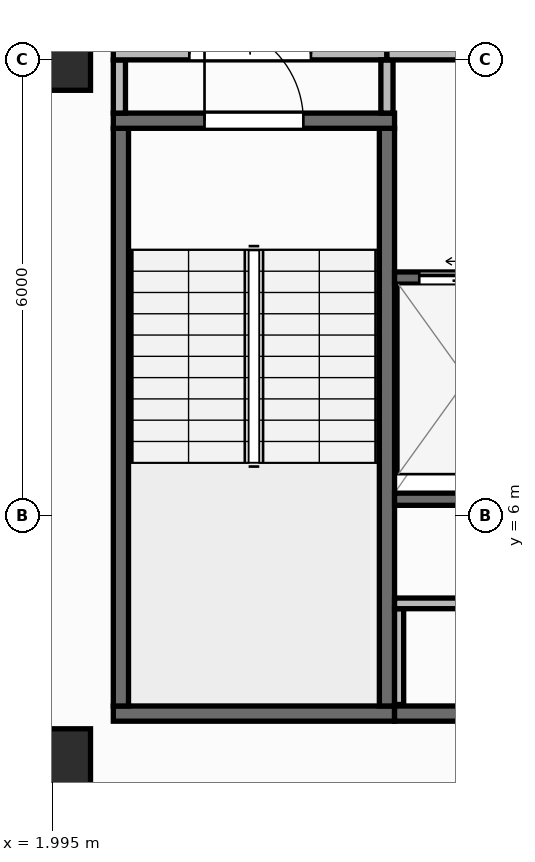
"""IFC4 building model, lengths in metres.
Left out: names, types, materials, properties, quantities, classifications, styles, units other than length and angle.
Written with IfcOpenShell. Run it as: python <this file> out.ifc"""

import sys

from ifc_helpers import new_model, si_unit, direction, frame, frame_2d, origin, origin_2d, place, context, subcontext, project, spatial, rectangle, extrude, element, fill, save


model = new_model("IFC4")
c1 = context("Model", 3, precision=1e-05, world=origin(), true_north=direction((0.0, 1.0)))
c2 = subcontext(c1, "Body", "Model", "MODEL_VIEW")
j1 = project(units=[si_unit("LENGTHUNIT", "METRE"), si_unit("PLANEANGLEUNIT", "RADIAN")], contexts=[c1])
p1 = place(None, origin())
s1 = spatial("IfcSite", under=j1, at=p1, CompositionType="ELEMENT")
p2 = place(p1, origin())
s2 = spatial("IfcBuilding", under=s1, at=p2, CompositionType="ELEMENT")
p3 = place(p2, frame((0.0, 0.0, 276.3)))
s3 = spatial("IfcBuildingStorey", under=s2, at=p3, CompositionType="ELEMENT", Elevation=276.3)
for number, where, z_axis, x_axis in (
    (1, (2.1, 2.8, 0.0), (0.0, 0.0, 1.0), (1.0, 0.0, 0.0)),
    (2, (2.1, 12.0, 0.0), (0.0, 0.0, 1.0), (1.0, 0.0, 0.0)),
):
    element("IfcColumn", number, at=place(p3, frame(where, z_axis=z_axis, x_axis=x_axis)), inside=s3, PredefinedType="COLUMN", context=c2, shape_type="SweptSolid", body=[
        extrude(rectangle(XDim=0.8, YDim=0.8, at=origin_2d()), origin(), (0.0, 0.0, 1.0), 3.95),
    ])
p4 = place(p3, frame((2.46, 0.172, 0.0), z_axis=(0.0, 0.0, 1.0), x_axis=(0.997289775118, 0.073573802713, 0.0)))
e3 = element("IfcWall", 3, at=p4, inside=s3, PredefinedType="STANDARD", context=c2, shape_type="SweptSolid", body=[
    extrude(rectangle(XDim=36.379, YDim=0.26, at=frame_2d((18.189, 0.0))), origin(), (0.0, 0.0, 1.0), 3.71),
])
p5 = place(p4, frame((16.989, 0.0, 0.9)))
e4 = element("IfcOpeningElement", 4, at=p5, cuts=e3, PredefinedType="OPENING", context=c2, shape_type="SweptSolid", body=[
    extrude(rectangle(XDim=2.4, YDim=1.65, at=frame_2d((1.2, 0.825))), frame((0.0, 0.14, 0.0), z_axis=(0.0, -1.0, 0.0), x_axis=(1.0, 0.0, 0.0)), (0.0, 0.0, 1.0), 0.28),
])
p6 = place(p3, frame((2.8, 3.4, 0.0), z_axis=(0.0, 0.0, 1.0), x_axis=(1.0, 0.0, 0.0)))
e5 = element("IfcWall", 5, at=p6, inside=s3, PredefinedType="SHEAR", context=c2, shape_type="SweptSolid", body=[
    extrude(rectangle(XDim=3.7, YDim=0.2, at=frame_2d((1.85, 0.0))), origin(), (0.0, 0.0, 1.0), 3.71),
])
for number, where, z_axis, x_axis in (
    (6, (2.9, 3.5, 0.0), (0.0, 0.0, 1.0), (0.0, 1.0, 0.0)),
    (7, (6.4, 3.5, 0.0), (0.0, 0.0, 1.0), (0.0, 1.0, 0.0)),
):
    element("IfcWall", number, at=place(p3, frame(where, z_axis=z_axis, x_axis=x_axis)), inside=s3, PredefinedType="SHEAR", context=c2, shape_type="SweptSolid", body=[
        extrude(rectangle(XDim=7.6, YDim=0.2, at=frame_2d((3.8, 0.0))), origin(), (0.0, 0.0, 1.0), 3.71),
    ])
p7 = place(p3, frame((2.8, 11.2, 0.0), z_axis=(0.0, 0.0, 1.0), x_axis=(1.0, 0.0, 0.0)))
e8 = element("IfcWall", 8, at=p7, inside=s3, PredefinedType="SHEAR", context=c2, shape_type="SweptSolid", body=[
    extrude(rectangle(XDim=3.7, YDim=0.2, at=frame_2d((1.85, 0.0))), origin(), (0.0, 0.0, 1.0), 3.71),
])
p8 = place(p7, frame((1.2, 0.0, 0.0)))
e9 = element("IfcOpeningElement", 9, at=p8, cuts=e8, PredefinedType="OPENING", context=c2, shape_type="SweptSolid", body=[
    extrude(rectangle(XDim=1.3, YDim=2.15, at=frame_2d((0.65, 1.075))), frame((0.0, 0.11, 0.0), z_axis=(0.0, -1.0, 0.0), x_axis=(1.0, 0.0, 0.0)), (0.0, 0.0, 1.0), 0.22),
])
p9 = place(p3, frame((6.5, 3.4, 0.0), z_axis=(0.0, 0.0, 1.0), x_axis=(1.0, 0.0, 0.0)))
e10 = element("IfcWall", 10, at=p9, inside=s3, PredefinedType="SHEAR", context=c2, shape_type="SweptSolid", body=[
    extrude(rectangle(XDim=13.7, YDim=0.2, at=frame_2d((6.85, 0.0))), origin(), (0.0, 0.0, 1.0), 3.71),
])
p10 = place(p3, frame((6.5, 6.22, 0.0), z_axis=(0.0, 0.0, 1.0), x_axis=(1.0, 0.0, 0.0)))
e11 = element("IfcWall", 11, at=p10, inside=s3, PredefinedType="SHEAR", context=c2, shape_type="SweptSolid", body=[
    extrude(rectangle(XDim=12.11, YDim=0.16, at=frame_2d((6.055, 0.0))), origin(), (0.0, 0.0, 1.0), 3.71),
])
p11 = place(p3, frame((6.5, 9.13, 0.0), z_axis=(0.0, 0.0, 1.0), x_axis=(1.0, 0.0, 0.0)))
e12 = element("IfcWall", 12, at=p11, inside=s3, PredefinedType="SHEAR", context=c2, shape_type="SweptSolid", body=[
    extrude(rectangle(XDim=1.975, YDim=0.16, at=frame_2d((0.988, 0.0))), origin(), (0.0, 0.0, 1.0), 3.71),
])
p12 = place(p11, frame((0.325, 0.0, 0.0)))
e13 = element("IfcOpeningElement", 13, at=p12, cuts=e12, PredefinedType="OPENING", context=c2, shape_type="SweptSolid", body=[
    extrude(rectangle(XDim=1.25, YDim=2.15, at=frame_2d((0.625, 1.075))), frame((0.0, 0.09, 0.0), z_axis=(0.0, -1.0, 0.0), x_axis=(1.0, 0.0, 0.0)), (0.0, 0.0, 1.0), 0.18),
])
p13 = place(p3, frame((6.56, 3.52, 0.0), z_axis=(0.0, 0.0, 1.0), x_axis=(0.0, 1.0, 0.0)))
e14 = element("IfcWall", 14, at=p13, inside=s3, PredefinedType="PARTITIONING", context=c2, shape_type="SweptSolid", body=[
    extrude(rectangle(XDim=1.26, YDim=0.12, at=frame_2d((0.63, 0.0))), origin(), (0.0, 0.0, 1.0), 3.71),
])
p14 = place(p3, frame((6.5, 4.85, 0.0), z_axis=(0.0, 0.0, 1.0), x_axis=(1.0, 0.0, 0.0)))
e15 = element("IfcWall", 15, at=p14, inside=s3, PredefinedType="PARTITIONING", context=c2, shape_type="SweptSolid", body=[
    extrude(rectangle(XDim=5.67, YDim=0.14, at=frame_2d((2.835, 0.0))), origin(), (0.0, 0.0, 1.0), 3.71),
])
p15 = place(p14, frame((2.285, 0.0, 0.0)))
e16 = element("IfcOpeningElement", 16, at=p15, cuts=e15, PredefinedType="OPENING", context=c2, shape_type="SweptSolid", body=[
    extrude(rectangle(XDim=1.1, YDim=2.1, at=frame_2d((0.55, 1.05))), frame((0.0, 0.08, 0.0), z_axis=(0.0, -1.0, 0.0), x_axis=(1.0, 0.0, 0.0)), (0.0, 0.0, 1.0), 0.16),
])
p16 = place(p3, frame((2.88, 11.3, 0.0), z_axis=(0.0, 0.0, 1.0), x_axis=(0.0, 1.0, 0.0)))
e17 = element("IfcWall", 17, at=p16, inside=s3, PredefinedType="PARTITIONING", context=c2, shape_type="SweptSolid", body=[
    extrude(rectangle(XDim=0.7, YDim=0.16, at=frame_2d((0.35, 0.0))), origin(), (0.0, 0.0, 1.0), 3.71),
])
p17 = place(p3, frame((2.8, 12.08, 0.0), z_axis=(0.0, 0.0, 1.0), x_axis=(1.0, 0.0, 0.0)))
e18 = element("IfcWall", 18, at=p17, inside=s3, PredefinedType="PARTITIONING", context=c2, shape_type="SweptSolid", body=[
    extrude(rectangle(XDim=3.6, YDim=0.16, at=frame_2d((1.8, 0.0))), origin(), (0.0, 0.0, 1.0), 3.157),
])
p18 = place(p17, frame((1.0, 0.0, 0.0)))
e19 = element("IfcOpeningElement", 19, at=p18, cuts=e18, PredefinedType="OPENING", context=c2, shape_type="SweptSolid", body=[
    extrude(rectangle(XDim=1.6, YDim=2.05, at=frame_2d((0.8, 1.025))), frame((0.0, 0.09, 0.0), z_axis=(0.0, -1.0, 0.0), x_axis=(1.0, 0.0, 0.0)), (0.0, 0.0, 1.0), 0.18),
])
p19 = place(p3, frame((6.4, 11.3, 0.0), z_axis=(0.0, 0.0, 1.0), x_axis=(0.0, 1.0, 0.0)))
e20 = element("IfcWall", 20, at=p19, inside=s3, PredefinedType="PARTITIONING", context=c2, shape_type="SweptSolid", body=[
    extrude(rectangle(XDim=0.7, YDim=0.16, at=frame_2d((0.35, 0.0))), origin(), (0.0, 0.0, 1.0), 3.71),
])
p20 = place(p3, frame((6.4, 12.08, 0.0), z_axis=(0.0, 0.0, 1.0), x_axis=(1.0, 0.0, 0.0)))
e21 = element("IfcWall", 21, at=p20, inside=s3, PredefinedType="PARTITIONING", context=c2, shape_type="SweptSolid", body=[
    extrude(rectangle(XDim=6.18, YDim=0.16, at=frame_2d((3.09, 0.0))), origin(), (0.0, 0.0, 1.0), 3.157),
])
p21 = place(p20, frame((2.29, 0.0, 0.0)))
e22 = element("IfcOpeningElement", 22, at=p21, cuts=e21, PredefinedType="OPENING", context=c2, shape_type="SweptSolid", body=[
    extrude(rectangle(XDim=1.6, YDim=2.05, at=frame_2d((0.8, 1.025))), frame((0.0, 0.09, 0.0), z_axis=(0.0, -1.0, 0.0), x_axis=(1.0, 0.0, 0.0)), (0.0, 0.0, 1.0), 0.18),
])
p22 = place(p8, origin())
e23 = element("IfcDoor", 23, at=p22, inside=s3, OperationType="SINGLE_SWING_LEFT", PredefinedType="DOOR", context=c2, shape_type="SweptSolid", body=[
    extrude(rectangle(XDim=1.3, YDim=2.15, at=frame_2d((0.65, 1.075))), frame((0.0, 0.025, 0.0), z_axis=(0.0, -1.0, 0.0), x_axis=(1.0, 0.0, 0.0)), (0.0, 0.0, 1.0), 0.05),
])
fill(e9, e23)
p23 = place(p12, origin())
e24 = element("IfcDoor", 24, at=p23, inside=s3, OperationType="SLIDING_TO_LEFT", PredefinedType="DOOR", context=c2, shape_type="SweptSolid", body=[
    extrude(rectangle(XDim=1.25, YDim=2.15, at=frame_2d((0.625, 1.075))), frame((0.0, 0.025, 0.0), z_axis=(0.0, -1.0, 0.0), x_axis=(1.0, 0.0, 0.0)), (0.0, 0.0, 1.0), 0.05),
])
fill(e13, e24)
p24 = place(p18, origin())
e25 = element("IfcDoor", 25, at=p24, inside=s3, OperationType="DOUBLE_DOOR_SINGLE_SWING", PredefinedType="DOOR", context=c2, shape_type="SweptSolid", body=[
    extrude(rectangle(XDim=1.6, YDim=2.05, at=frame_2d((0.8, 1.025))), frame((0.0, 0.025, 0.0), z_axis=(0.0, -1.0, 0.0), x_axis=(1.0, 0.0, 0.0)), (0.0, 0.0, 1.0), 0.05),
])
fill(e19, e25)
save(model, sys.argv[1])
